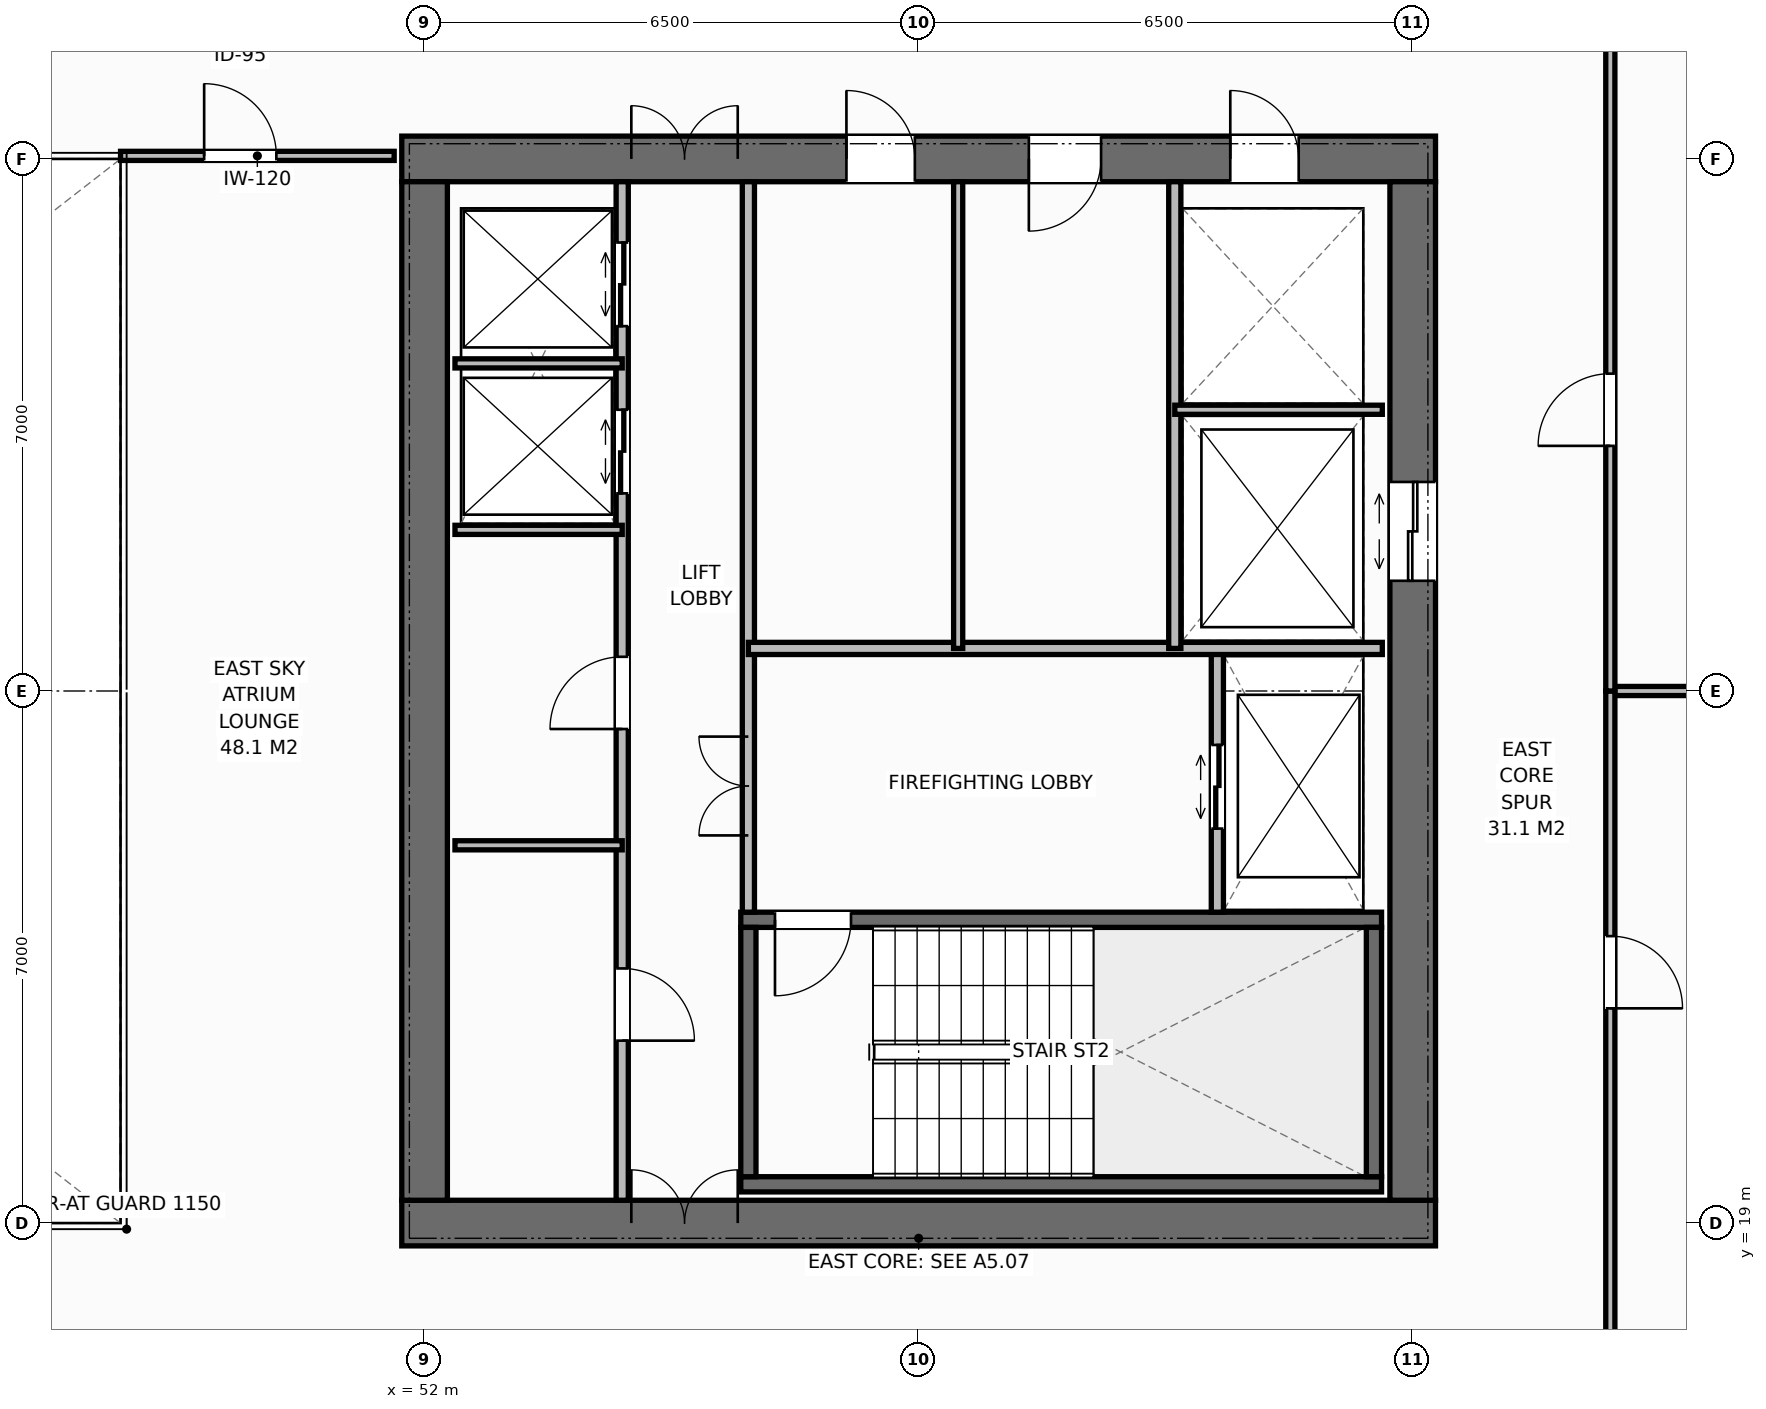
"""IFC4 building model, lengths in metres.
Left out: names, types, materials, properties, quantities, classifications, styles, units other than length and angle.
Written with IfcOpenShell. Run it as: python <this file> out.ifc"""

import sys

from ifc_helpers import new_model, si_unit, direction, frame, frame_2d, origin, place, context, subcontext, project, spatial, rectangle, extrude, element, fill, save


model = new_model("IFC4")
c1 = context("Model", 3, precision=1e-05, world=origin(), true_north=direction((0.0, 1.0)))
c2 = subcontext(c1, "Body", "Model", "MODEL_VIEW")
j1 = project(units=[si_unit("LENGTHUNIT", "METRE"), si_unit("PLANEANGLEUNIT", "RADIAN")], contexts=[c1])
p1 = place(None, origin())
s1 = spatial("IfcSite", under=j1, at=p1, CompositionType="ELEMENT")
p2 = place(p1, origin())
s2 = spatial("IfcBuilding", under=s1, at=p2, CompositionType="ELEMENT")
p3 = place(p2, frame((0.0, 0.0, 163.2)))
s3 = spatial("IfcBuildingStorey", under=s2, at=p3, CompositionType="ELEMENT", Elevation=163.2)
p4 = place(p3, frame((51.7, 19.0, 0.0), z_axis=(0.0, 0.0, 1.0), x_axis=(1.0, 0.0, 0.0)))
e1 = element("IfcWall", 1, at=p4, inside=s3, PredefinedType="SHEAR", context=c2, shape_type="SweptSolid", body=[
    extrude(rectangle(XDim=13.6, YDim=0.6, at=frame_2d((6.8, 0.0))), origin(), (0.0, 0.0, 1.0), 3.8),
])
p5 = place(p4, frame((3.02, 0.0, 0.0)))
e2 = element("IfcOpeningElement", 2, at=p5, cuts=e1, PredefinedType="OPENING", context=c2, shape_type="SweptSolid", body=[
    extrude(rectangle(XDim=1.4, YDim=2.2, at=frame_2d((0.7, 1.1))), frame((0.0, 0.31, 0.0), z_axis=(0.0, -1.0, 0.0), x_axis=(1.0, 0.0, 0.0)), (0.0, 0.0, 1.0), 0.62),
])
p6 = place(p3, frame((51.7, 33.0, 0.0), z_axis=(0.0, 0.0, 1.0), x_axis=(1.0, 0.0, 0.0)))
e3 = element("IfcWall", 3, at=p6, inside=s3, PredefinedType="SHEAR", context=c2, shape_type="SweptSolid", body=[
    extrude(rectangle(XDim=13.6, YDim=0.6, at=frame_2d((6.8, 0.0))), origin(), (0.0, 0.0, 1.0), 3.8),
])
p7 = place(p6, frame((3.02, 0.0, 0.0)))
e4 = element("IfcOpeningElement", 4, at=p7, cuts=e3, PredefinedType="OPENING", context=c2, shape_type="SweptSolid", body=[
    extrude(rectangle(XDim=1.4, YDim=2.2, at=frame_2d((0.7, 1.1))), frame((0.0, 0.31, 0.0), z_axis=(0.0, -1.0, 0.0), x_axis=(1.0, 0.0, 0.0)), (0.0, 0.0, 1.0), 0.62),
])
p8 = place(p6, frame((10.9, 0.0, 0.0)))
e5 = element("IfcOpeningElement", 5, at=p8, cuts=e3, PredefinedType="OPENING", context=c2, shape_type="SweptSolid", body=[
    extrude(rectangle(XDim=0.9, YDim=2.15, at=frame_2d((0.45, 1.075))), frame((0.0, 0.31, 0.0), z_axis=(0.0, -1.0, 0.0), x_axis=(1.0, 0.0, 0.0)), (0.0, 0.0, 1.0), 0.62),
])
p9 = place(p6, frame((5.85, 0.0, 0.0)))
e6 = element("IfcOpeningElement", 6, at=p9, cuts=e3, PredefinedType="OPENING", context=c2, shape_type="SweptSolid", body=[
    extrude(rectangle(XDim=0.9, YDim=2.15, at=frame_2d((0.45, 1.075))), frame((0.0, 0.31, 0.0), z_axis=(0.0, -1.0, 0.0), x_axis=(1.0, 0.0, 0.0)), (0.0, 0.0, 1.0), 0.62),
])
p10 = place(p6, frame((8.25, 0.0, 0.0)))
e7 = element("IfcOpeningElement", 7, at=p10, cuts=e3, PredefinedType="OPENING", context=c2, shape_type="SweptSolid", body=[
    extrude(rectangle(XDim=0.95, YDim=2.15, at=frame_2d((0.475, 1.075))), frame((0.0, 0.31, 0.0), z_axis=(0.0, -1.0, 0.0), x_axis=(1.0, 0.0, 0.0)), (0.0, 0.0, 1.0), 0.62),
])
p11 = place(p3, frame((52.0, 19.3, 0.0), z_axis=(0.0, 0.0, 1.0), x_axis=(0.0, 1.0, 0.0)))
e8 = element("IfcWall", 8, at=p11, inside=s3, PredefinedType="SHEAR", context=c2, shape_type="SweptSolid", body=[
    extrude(rectangle(XDim=13.4, YDim=0.6, at=frame_2d((6.7, 0.0))), origin(), (0.0, 0.0, 1.0), 3.8),
])
p12 = place(p3, frame((65.0, 19.3, 0.0), z_axis=(0.0, 0.0, 1.0), x_axis=(0.0, 1.0, 0.0)))
e9 = element("IfcWall", 9, at=p12, inside=s3, PredefinedType="SHEAR", context=c2, shape_type="SweptSolid", body=[
    extrude(rectangle(XDim=13.4, YDim=0.6, at=frame_2d((6.7, 0.0))), origin(), (0.0, 0.0, 1.0), 3.8),
])
p13 = place(p12, frame((8.15, 0.0, 0.0)))
e10 = element("IfcOpeningElement", 10, at=p13, cuts=e9, PredefinedType="OPENING", context=c2, shape_type="SweptSolid", body=[
    extrude(rectangle(XDim=1.3, YDim=2.2, at=frame_2d((0.65, 1.1))), frame((0.0, 0.31, 0.0), z_axis=(0.0, -1.0, 0.0), x_axis=(1.0, 0.0, 0.0)), (0.0, 0.0, 1.0), 0.62),
])
p14 = place(p3, frame((56.16, 19.51, 0.0), z_axis=(0.0, 0.0, 1.0), x_axis=(1.0, 0.0, 0.0)))
e11 = element("IfcWall", 11, at=p14, inside=s3, PredefinedType="SHEAR", context=c2, shape_type="SweptSolid", body=[
    extrude(rectangle(XDim=8.43, YDim=0.2, at=frame_2d((4.215, 0.0))), origin(), (0.0, 0.0, 1.0), 3.8),
])
p15 = place(p3, frame((56.16, 22.99, 0.0), z_axis=(0.0, 0.0, 1.0), x_axis=(1.0, 0.0, 0.0)))
e12 = element("IfcWall", 12, at=p15, inside=s3, PredefinedType="SHEAR", context=c2, shape_type="SweptSolid", body=[
    extrude(rectangle(XDim=8.43, YDim=0.2, at=frame_2d((4.215, 0.0))), origin(), (0.0, 0.0, 1.0), 3.8),
])
p16 = place(p15, frame((0.45, 0.0, 0.0)))
e13 = element("IfcOpeningElement", 13, at=p16, cuts=e12, PredefinedType="OPENING", context=c2, shape_type="SweptSolid", body=[
    extrude(rectangle(XDim=1.0, YDim=2.15, at=frame_2d((0.5, 1.075))), frame((0.0, 0.11, 0.0), z_axis=(0.0, -1.0, 0.0), x_axis=(1.0, 0.0, 0.0)), (0.0, 0.0, 1.0), 0.22),
])
for number, where, z_axis, x_axis in (
    (14, (56.26, 19.61, 0.0), (0.0, 0.0, 1.0), (0.0, 1.0, 0.0)),
    (15, (64.49, 19.61, 0.0), (0.0, 0.0, 1.0), (0.0, 1.0, 0.0)),
):
    element("IfcWall", number, at=place(p3, frame(where, z_axis=z_axis, x_axis=x_axis)), inside=s3, PredefinedType="SHEAR", context=c2, shape_type="SweptSolid", body=[
        extrude(rectangle(XDim=3.28, YDim=0.2, at=frame_2d((1.64, 0.0))), origin(), (0.0, 0.0, 1.0), 3.8),
    ])
p17 = place(p3, frame((54.6, 19.3, 0.0), z_axis=(0.0, 0.0, 1.0), x_axis=(0.0, 1.0, 0.0)))
e16 = element("IfcWall", 16, at=p17, inside=s3, PredefinedType="STANDARD", context=c2, shape_type="SweptSolid", body=[
    extrude(rectangle(XDim=13.4, YDim=0.16, at=frame_2d((6.7, 0.0))), origin(), (0.0, 0.0, 1.0), 3.572),
])
p18 = place(p17, frame((2.1, 0.0, 0.0)))
e17 = element("IfcOpeningElement", 17, at=p18, cuts=e16, PredefinedType="OPENING", context=c2, shape_type="SweptSolid", body=[
    extrude(rectangle(XDim=0.95, YDim=2.15, at=frame_2d((0.475, 1.075))), frame((0.0, 0.09, 0.0), z_axis=(0.0, -1.0, 0.0), x_axis=(1.0, 0.0, 0.0)), (0.0, 0.0, 1.0), 0.18),
])
p19 = place(p17, frame((6.2, 0.0, 0.0)))
e18 = element("IfcOpeningElement", 18, at=p19, cuts=e16, PredefinedType="OPENING", context=c2, shape_type="SweptSolid", body=[
    extrude(rectangle(XDim=0.95, YDim=2.15, at=frame_2d((0.475, 1.075))), frame((0.0, 0.09, 0.0), z_axis=(0.0, -1.0, 0.0), x_axis=(1.0, 0.0, 0.0)), (0.0, 0.0, 1.0), 0.18),
])
p20 = place(p17, frame((9.3, 0.0, 0.0)))
e19 = element("IfcOpeningElement", 19, at=p20, cuts=e16, PredefinedType="OPENING", context=c2, shape_type="SweptSolid", body=[
    extrude(rectangle(XDim=1.1, YDim=2.2, at=frame_2d((0.55, 1.1))), frame((0.0, 0.09, 0.0), z_axis=(0.0, -1.0, 0.0), x_axis=(1.0, 0.0, 0.0)), (0.0, 0.0, 1.0), 0.18),
])
p21 = place(p17, frame((11.5, 0.0, 0.0)))
e20 = element("IfcOpeningElement", 20, at=p21, cuts=e16, PredefinedType="OPENING", context=c2, shape_type="SweptSolid", body=[
    extrude(rectangle(XDim=1.1, YDim=2.2, at=frame_2d((0.55, 1.1))), frame((0.0, 0.09, 0.0), z_axis=(0.0, -1.0, 0.0), x_axis=(1.0, 0.0, 0.0)), (0.0, 0.0, 1.0), 0.18),
])
p22 = place(p3, frame((56.26, 23.09, 0.0), z_axis=(0.0, 0.0, 1.0), x_axis=(0.0, 1.0, 0.0)))
e21 = element("IfcWall", 21, at=p22, inside=s3, PredefinedType="STANDARD", context=c2, shape_type="SweptSolid", body=[
    extrude(rectangle(XDim=9.61, YDim=0.16, at=frame_2d((4.805, 0.0))), origin(), (0.0, 0.0, 1.0), 3.572),
])
p23 = place(p22, frame((1.01, 0.0, 0.0)))
e22 = element("IfcOpeningElement", 22, at=p23, cuts=e21, PredefinedType="OPENING", context=c2, shape_type="SweptSolid", body=[
    extrude(rectangle(XDim=1.3, YDim=2.2, at=frame_2d((0.65, 1.1))), frame((0.0, 0.09, 0.0), z_axis=(0.0, -1.0, 0.0), x_axis=(1.0, 0.0, 0.0)), (0.0, 0.0, 1.0), 0.18),
])
for number, where, z_axis, x_axis in (
    (23, (52.4, 23.97, 0.0), (0.0, 0.0, 1.0), (1.0, 0.0, 0.0)),
    (24, (52.4, 28.12, 0.0), (0.0, 0.0, 1.0), (1.0, 0.0, 0.0)),
    (25, (52.4, 30.31, 0.0), (0.0, 0.0, 1.0), (1.0, 0.0, 0.0)),
):
    element("IfcWall", number, at=place(p3, frame(where, z_axis=z_axis, x_axis=x_axis)), inside=s3, PredefinedType="PARTITIONING", context=c2, shape_type="SweptSolid", body=[
        extrude(rectangle(XDim=2.2, YDim=0.12, at=frame_2d((1.1, 0.0))), origin(), (0.0, 0.0, 1.0), 3.572),
    ])
p24 = place(p3, frame((62.43, 23.09, 0.0), z_axis=(0.0, 0.0, 1.0), x_axis=(0.0, 1.0, 0.0)))
e26 = element("IfcWall", 26, at=p24, inside=s3, PredefinedType="STANDARD", context=c2, shape_type="SweptSolid", body=[
    extrude(rectangle(XDim=3.47, YDim=0.16, at=frame_2d((1.735, 0.0))), origin(), (0.0, 0.0, 1.0), 3.572),
])
p25 = place(p24, frame((1.1, 0.0, 0.0)))
e27 = element("IfcOpeningElement", 27, at=p25, cuts=e26, PredefinedType="OPENING", context=c2, shape_type="SweptSolid", body=[
    extrude(rectangle(XDim=1.1, YDim=2.2, at=frame_2d((0.55, 1.1))), frame((0.0, 0.09, 0.0), z_axis=(0.0, -1.0, 0.0), x_axis=(1.0, 0.0, 0.0)), (0.0, 0.0, 1.0), 0.18),
])
p26 = place(p3, frame((56.26, 26.56, 0.0), z_axis=(0.0, 0.0, 1.0), x_axis=(1.0, 0.0, 0.0)))
e28 = element("IfcWall", 28, at=p26, inside=s3, PredefinedType="STANDARD", context=c2, shape_type="SweptSolid", body=[
    extrude(rectangle(XDim=8.34, YDim=0.16, at=frame_2d((4.17, 0.0))), origin(), (0.0, 0.0, 1.0), 3.572),
])
p27 = place(p3, frame((61.87, 26.56, 0.0), z_axis=(0.0, 0.0, 1.0), x_axis=(0.0, 1.0, 0.0)))
e29 = element("IfcWall", 29, at=p27, inside=s3, PredefinedType="STANDARD", context=c2, shape_type="SweptSolid", body=[
    extrude(rectangle(XDim=6.14, YDim=0.16, at=frame_2d((3.07, 0.0))), origin(), (0.0, 0.0, 1.0), 3.572),
])
p28 = place(p3, frame((61.87, 29.7, 0.0), z_axis=(0.0, 0.0, 1.0), x_axis=(1.0, 0.0, 0.0)))
e30 = element("IfcWall", 30, at=p28, inside=s3, PredefinedType="PARTITIONING", context=c2, shape_type="SweptSolid", body=[
    extrude(rectangle(XDim=2.73, YDim=0.12, at=frame_2d((1.365, 0.0))), origin(), (0.0, 0.0, 1.0), 3.572),
])
p29 = place(p3, frame((59.02, 26.56, 0.0), z_axis=(0.0, 0.0, 1.0), x_axis=(0.0, 1.0, 0.0)))
e31 = element("IfcWall", 31, at=p29, inside=s3, PredefinedType="PARTITIONING", context=c2, shape_type="SweptSolid", body=[
    extrude(rectangle(XDim=6.14, YDim=0.12, at=frame_2d((3.07, 0.0))), origin(), (0.0, 0.0, 1.0), 3.572),
])
p30 = place(p3, frame((48.0, 33.04, 0.0), z_axis=(0.0, 0.0, 1.0), x_axis=(1.0, 0.0, 0.0)))
e32 = element("IfcWall", 32, at=p30, inside=s3, PredefinedType="PARTITIONING", context=c2, shape_type="SweptSolid", body=[
    extrude(rectangle(XDim=3.6, YDim=0.12, at=frame_2d((1.8, 0.0))), origin(), (0.0, 0.0, 1.0), 3.312),
])
p31 = place(p30, frame((1.1, 0.0, 0.0)))
e33 = element("IfcOpeningElement", 33, at=p31, cuts=e32, PredefinedType="OPENING", context=c2, shape_type="SweptSolid", body=[
    extrude(rectangle(XDim=0.95, YDim=2.15, at=frame_2d((0.475, 1.075))), frame((0.0, 0.07, 0.0), z_axis=(0.0, -1.0, 0.0), x_axis=(1.0, 0.0, 0.0)), (0.0, 0.0, 1.0), 0.14),
])
p32 = place(p3, frame((67.6, 26.0, 0.0), z_axis=(0.0, 0.0, 1.0), x_axis=(1.0, 0.0, 0.0)))
e34 = element("IfcWall", 34, at=p32, inside=s3, PredefinedType="PARTITIONING", context=c2, shape_type="SweptSolid", body=[
    extrude(rectangle(XDim=6.58, YDim=0.12, at=frame_2d((3.29, 0.0))), origin(), (0.0, 0.0, 1.0), 3.572),
])
p33 = place(p3, frame((67.6, 16.5, 0.0), z_axis=(0.0, 0.0, 1.0), x_axis=(0.0, 1.0, 0.0)))
e35 = element("IfcWall", 35, at=p33, inside=s3, PredefinedType="PARTITIONING", context=c2, shape_type="SweptSolid", body=[
    extrude(rectangle(XDim=9.5, YDim=0.12, at=frame_2d((4.75, 0.0))), origin(), (0.0, 0.0, 1.0), 3.572),
])
p34 = place(p33, frame((5.325, 0.0, 0.0)))
e36 = element("IfcOpeningElement", 36, at=p34, cuts=e35, PredefinedType="OPENING", context=c2, shape_type="SweptSolid", body=[
    extrude(rectangle(XDim=0.95, YDim=2.15, at=frame_2d((0.475, 1.075))), frame((0.0, 0.07, 0.0), z_axis=(0.0, -1.0, 0.0), x_axis=(1.0, 0.0, 0.0)), (0.0, 0.0, 1.0), 0.14),
])
p35 = place(p3, frame((67.6, 26.0, 0.0), z_axis=(0.0, 0.0, 1.0), x_axis=(0.0, 1.0, 0.0)))
e37 = element("IfcWall", 37, at=p35, inside=s3, PredefinedType="PARTITIONING", context=c2, shape_type="SweptSolid", body=[
    extrude(rectangle(XDim=9.5, YDim=0.12, at=frame_2d((4.75, 0.0))), origin(), (0.0, 0.0, 1.0), 3.572),
])
p36 = place(p35, frame((3.225, 0.0, 0.0)))
e38 = element("IfcOpeningElement", 38, at=p36, cuts=e37, PredefinedType="OPENING", context=c2, shape_type="SweptSolid", body=[
    extrude(rectangle(XDim=0.95, YDim=2.15, at=frame_2d((0.475, 1.075))), frame((0.0, 0.07, 0.0), z_axis=(0.0, -1.0, 0.0), x_axis=(1.0, 0.0, 0.0)), (0.0, 0.0, 1.0), 0.14),
])
p37 = place(p5, origin())
e39 = element("IfcDoor", 39, at=p37, inside=s3, OperationType="DOUBLE_DOOR_SINGLE_SWING", PredefinedType="DOOR", context=c2, shape_type="SweptSolid", body=[
    extrude(rectangle(XDim=1.4, YDim=2.2, at=frame_2d((0.7, 1.1))), frame((0.0, 0.075, 0.0), z_axis=(0.0, -1.0, 0.0), x_axis=(1.0, 0.0, 0.0)), (0.0, 0.0, 1.0), 0.05),
])
fill(e2, e39)
p38 = place(p7, origin())
e40 = element("IfcDoor", 40, at=p38, inside=s3, OperationType="DOUBLE_DOOR_SINGLE_SWING", PredefinedType="DOOR", context=c2, shape_type="SweptSolid", body=[
    extrude(rectangle(XDim=1.4, YDim=2.2, at=frame_2d((0.7, 1.1))), frame((0.0, -0.025, 0.0), z_axis=(0.0, -1.0, 0.0), x_axis=(1.0, 0.0, 0.0)), (0.0, 0.0, 1.0), 0.05),
])
fill(e4, e40)
p39 = place(p18, origin())
e41 = element("IfcDoor", 41, at=p39, inside=s3, OperationType="SINGLE_SWING_RIGHT", PredefinedType="DOOR", context=c2, shape_type="SweptSolid", body=[
    extrude(rectangle(XDim=0.95, YDim=2.15, at=frame_2d((0.475, 1.075))), frame((0.0, 0.025, 0.0), z_axis=(0.0, -1.0, 0.0), x_axis=(1.0, 0.0, 0.0)), (0.0, 0.0, 1.0), 0.05),
])
fill(e17, e41)
p40 = place(p19, origin())
e42 = element("IfcDoor", 42, at=p40, inside=s3, OperationType="SINGLE_SWING_LEFT", PredefinedType="DOOR", context=c2, shape_type="SweptSolid", body=[
    extrude(rectangle(XDim=0.95, YDim=2.15, at=frame_2d((0.475, 1.075))), frame((0.0, 0.025, 0.0), z_axis=(0.0, -1.0, 0.0), x_axis=(1.0, 0.0, 0.0)), (0.0, 0.0, 1.0), 0.05),
])
fill(e18, e42)
p41 = place(p20, origin())
e43 = element("IfcDoor", 43, at=p41, inside=s3, OperationType="DOUBLE_DOOR_SLIDING", PredefinedType="DOOR", context=c2, shape_type="SweptSolid", body=[
    extrude(rectangle(XDim=1.1, YDim=2.2, at=frame_2d((0.55, 1.1))), frame((0.0, 0.025, 0.0), z_axis=(0.0, -1.0, 0.0), x_axis=(1.0, 0.0, 0.0)), (0.0, 0.0, 1.0), 0.05),
])
fill(e19, e43)
p42 = place(p21, origin())
e44 = element("IfcDoor", 44, at=p42, inside=s3, OperationType="DOUBLE_DOOR_SLIDING", PredefinedType="DOOR", context=c2, shape_type="SweptSolid", body=[
    extrude(rectangle(XDim=1.1, YDim=2.2, at=frame_2d((0.55, 1.1))), frame((0.0, 0.025, 0.0), z_axis=(0.0, -1.0, 0.0), x_axis=(1.0, 0.0, 0.0)), (0.0, 0.0, 1.0), 0.05),
])
fill(e20, e44)
p43 = place(p16, origin())
e45 = element("IfcDoor", 45, at=p43, inside=s3, OperationType="SINGLE_SWING_RIGHT", PredefinedType="DOOR", context=c2, shape_type="SweptSolid", body=[
    extrude(rectangle(XDim=1.0, YDim=2.15, at=frame_2d((0.5, 1.075))), frame((0.0, 0.025, 0.0), z_axis=(0.0, -1.0, 0.0), x_axis=(1.0, 0.0, 0.0)), (0.0, 0.0, 1.0), 0.05),
])
fill(e13, e45)
p44 = place(p25, origin())
e46 = element("IfcDoor", 46, at=p44, inside=s3, OperationType="DOUBLE_DOOR_SLIDING", PredefinedType="DOOR", context=c2, shape_type="SweptSolid", body=[
    extrude(rectangle(XDim=1.1, YDim=2.2, at=frame_2d((0.55, 1.1))), frame((0.0, 0.025, 0.0), z_axis=(0.0, -1.0, 0.0), x_axis=(1.0, 0.0, 0.0)), (0.0, 0.0, 1.0), 0.05),
])
fill(e27, e46)
p45 = place(p23, origin())
e47 = element("IfcDoor", 47, at=p45, inside=s3, OperationType="DOUBLE_DOOR_SINGLE_SWING", PredefinedType="DOOR", context=c2, shape_type="SweptSolid", body=[
    extrude(rectangle(XDim=1.3, YDim=2.2, at=frame_2d((0.65, 1.1))), frame((0.0, 0.025, 0.0), z_axis=(0.0, -1.0, 0.0), x_axis=(1.0, 0.0, 0.0)), (0.0, 0.0, 1.0), 0.05),
])
fill(e22, e47)
p46 = place(p13, origin())
e48 = element("IfcDoor", 48, at=p46, inside=s3, OperationType="DOUBLE_DOOR_SLIDING", PredefinedType="DOOR", context=c2, shape_type="SweptSolid", body=[
    extrude(rectangle(XDim=1.3, YDim=2.2, at=frame_2d((0.65, 1.1))), frame((0.0, 0.025, 0.0), z_axis=(0.0, -1.0, 0.0), x_axis=(1.0, 0.0, 0.0)), (0.0, 0.0, 1.0), 0.05),
])
fill(e10, e48)
p47 = place(p8, origin())
e49 = element("IfcDoor", 49, at=p47, inside=s3, OperationType="SINGLE_SWING_LEFT", PredefinedType="DOOR", context=c2, shape_type="SweptSolid", body=[
    extrude(rectangle(XDim=0.9, YDim=2.15, at=frame_2d((0.45, 1.075))), frame((0.0, -0.025, 0.0), z_axis=(0.0, -1.0, 0.0), x_axis=(1.0, 0.0, 0.0)), (0.0, 0.0, 1.0), 0.05),
])
fill(e5, e49)
p48 = place(p9, origin())
e50 = element("IfcDoor", 50, at=p48, inside=s3, OperationType="SINGLE_SWING_LEFT", PredefinedType="DOOR", context=c2, shape_type="SweptSolid", body=[
    extrude(rectangle(XDim=0.9, YDim=2.15, at=frame_2d((0.45, 1.075))), frame((0.0, -0.025, 0.0), z_axis=(0.0, -1.0, 0.0), x_axis=(1.0, 0.0, 0.0)), (0.0, 0.0, 1.0), 0.05),
])
fill(e6, e50)
p49 = place(p10, origin())
e51 = element("IfcDoor", 51, at=p49, inside=s3, OperationType="SINGLE_SWING_RIGHT", PredefinedType="DOOR", context=c2, shape_type="SweptSolid", body=[
    extrude(rectangle(XDim=0.95, YDim=2.15, at=frame_2d((0.475, 1.075))), frame((0.0, -0.025, 0.0), z_axis=(0.0, -1.0, 0.0), x_axis=(1.0, 0.0, 0.0)), (0.0, 0.0, 1.0), 0.05),
])
fill(e7, e51)
p50 = place(p31, origin())
e52 = element("IfcDoor", 52, at=p50, inside=s3, OperationType="SINGLE_SWING_LEFT", PredefinedType="DOOR", context=c2, shape_type="SweptSolid", body=[
    extrude(rectangle(XDim=0.95, YDim=2.15, at=frame_2d((0.475, 1.075))), frame((0.0, 0.025, 0.0), z_axis=(0.0, -1.0, 0.0), x_axis=(1.0, 0.0, 0.0)), (0.0, 0.0, 1.0), 0.05),
])
fill(e33, e52)
p51 = place(p34, origin())
e53 = element("IfcDoor", 53, at=p51, inside=s3, OperationType="SINGLE_SWING_RIGHT", PredefinedType="DOOR", context=c2, shape_type="SweptSolid", body=[
    extrude(rectangle(XDim=0.95, YDim=2.15, at=frame_2d((0.475, 1.075))), frame((0.0, 0.025, 0.0), z_axis=(0.0, -1.0, 0.0), x_axis=(1.0, 0.0, 0.0)), (0.0, 0.0, 1.0), 0.05),
])
fill(e36, e53)
p52 = place(p36, origin())
e54 = element("IfcDoor", 54, at=p52, inside=s3, OperationType="SINGLE_SWING_LEFT", PredefinedType="DOOR", context=c2, shape_type="SweptSolid", body=[
    extrude(rectangle(XDim=0.95, YDim=2.15, at=frame_2d((0.475, 1.075))), frame((0.0, 0.025, 0.0), z_axis=(0.0, -1.0, 0.0), x_axis=(1.0, 0.0, 0.0)), (0.0, 0.0, 1.0), 0.05),
])
fill(e38, e54)
save(model, sys.argv[1])
